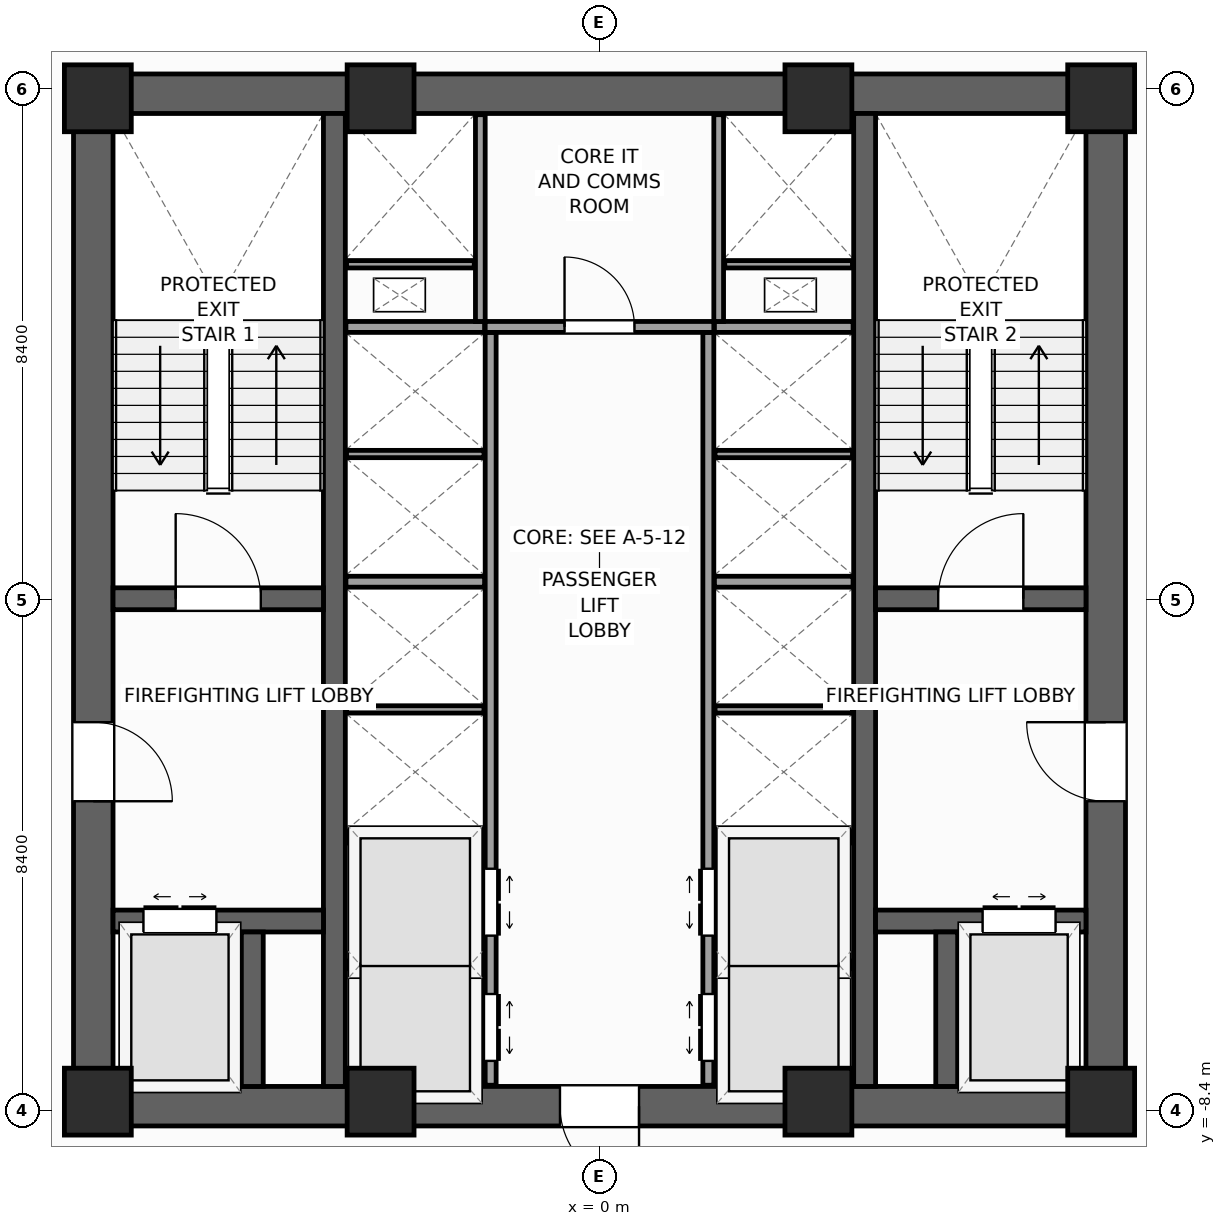
"""IFC4 building model, lengths in metres.
Left out: names, types, materials, properties, quantities, classifications, styles, units other than length and angle.
Written with IfcOpenShell. Run it as: python <this file> out.ifc"""

import sys

from ifc_helpers import new_model, si_unit, direction, frame, frame_2d, origin, origin_2d, place, context, subcontext, project, spatial, rectangle, extrude, source, transform, mapped, element, fill, save


model = new_model("IFC4")
c1 = context("Model", 3, precision=1e-05, world=origin(), true_north=direction((0.0, 1.0)))
c2 = subcontext(c1, "Body", "Model", "MODEL_VIEW")
j1 = project(units=[si_unit("LENGTHUNIT", "METRE"), si_unit("PLANEANGLEUNIT", "RADIAN")], contexts=[c1])
p1 = place(None, origin())
s1 = spatial("IfcSite", under=j1, at=p1, CompositionType="ELEMENT")
p2 = place(p1, origin())
s2 = spatial("IfcBuilding", under=s1, at=p2, CompositionType="ELEMENT")
p3 = place(p2, frame((0.0, 0.0, 99.2)))
s3 = spatial("IfcBuildingStorey", under=s2, at=p3, CompositionType="ELEMENT", Elevation=99.2)
p4 = place(p3, frame((-8.65, -8.325, 0.0), z_axis=(0.0, 0.0, 1.0), x_axis=(1.0, 0.0, 0.0)))
e1 = element("IfcWall", 1, at=p4, inside=s3, PredefinedType="SHEAR", context=c2, shape_type="SweptSolid", body=[
    extrude(rectangle(XDim=17.3, YDim=0.65, at=frame_2d((8.65, 0.0))), origin(), (0.0, 0.0, 1.0), 4.0),
])
p5 = place(p4, frame((8.0, 0.0, 0.0)))
e2 = element("IfcOpeningElement", 2, at=p5, cuts=e1, PredefinedType="OPENING", context=c2, shape_type="SweptSolid", body=[
    extrude(rectangle(XDim=1.3, YDim=2.2, at=frame_2d((0.65, 1.1))), frame((0.0, 0.335, 0.0), z_axis=(0.0, -1.0, 0.0), x_axis=(1.0, 0.0, 0.0)), (0.0, 0.0, 1.0), 0.67),
])
p6 = place(p3, frame((-8.65, 8.325, 0.0), z_axis=(0.0, 0.0, 1.0), x_axis=(1.0, 0.0, 0.0)))
e3 = element("IfcWall", 3, at=p6, inside=s3, PredefinedType="SHEAR", context=c2, shape_type="SweptSolid", body=[
    extrude(rectangle(XDim=17.3, YDim=0.65, at=frame_2d((8.65, 0.0))), origin(), (0.0, 0.0, 1.0), 4.0),
])
p7 = place(p3, frame((-8.325, -8.0, 0.0), z_axis=(0.0, 0.0, 1.0), x_axis=(0.0, 1.0, 0.0)))
e4 = element("IfcWall", 4, at=p7, inside=s3, PredefinedType="SHEAR", context=c2, shape_type="SweptSolid", body=[
    extrude(rectangle(XDim=16.0, YDim=0.65, at=frame_2d((8.0, 0.0))), origin(), (0.0, 0.0, 1.0), 4.0),
])
p8 = place(p7, frame((4.69, 0.0, 0.0)))
e5 = element("IfcOpeningElement", 5, at=p8, cuts=e4, PredefinedType="OPENING", context=c2, shape_type="SweptSolid", body=[
    extrude(rectangle(XDim=1.3, YDim=2.2, at=frame_2d((0.65, 1.1))), frame((0.0, 0.335, 0.0), z_axis=(0.0, -1.0, 0.0), x_axis=(1.0, 0.0, 0.0)), (0.0, 0.0, 1.0), 0.67),
])
p9 = place(p3, frame((8.325, -8.0, 0.0), z_axis=(0.0, 0.0, 1.0), x_axis=(0.0, 1.0, 0.0)))
e6 = element("IfcWall", 6, at=p9, inside=s3, PredefinedType="SHEAR", context=c2, shape_type="SweptSolid", body=[
    extrude(rectangle(XDim=16.0, YDim=0.65, at=frame_2d((8.0, 0.0))), origin(), (0.0, 0.0, 1.0), 4.0),
])
p10 = place(p9, frame((4.69, 0.0, 0.0)))
e7 = element("IfcOpeningElement", 7, at=p10, cuts=e6, PredefinedType="OPENING", context=c2, shape_type="SweptSolid", body=[
    extrude(rectangle(XDim=1.3, YDim=2.2, at=frame_2d((0.65, 1.1))), frame((0.0, 0.335, 0.0), z_axis=(0.0, -1.0, 0.0), x_axis=(1.0, 0.0, 0.0)), (0.0, 0.0, 1.0), 0.67),
])
for number, where, z_axis, x_axis in (
    (8, (-4.36, -8.0, 0.0), (0.0, 0.0, 1.0), (0.0, 1.0, 0.0)),
    (9, (4.36, -8.0, 0.0), (0.0, 0.0, 1.0), (0.0, 1.0, 0.0)),
):
    element("IfcWall", number, at=place(p3, frame(where, z_axis=z_axis, x_axis=x_axis)), inside=s3, PredefinedType="SHEAR", context=c2, shape_type="SweptSolid", body=[
        extrude(rectangle(XDim=16.0, YDim=0.36, at=frame_2d((8.0, 0.0))), origin(), (0.0, 0.0, 1.0), 4.0),
    ])
p11 = place(p3, frame((-8.0, 0.02, 0.0), z_axis=(0.0, 0.0, 1.0), x_axis=(1.0, 0.0, 0.0)))
e10 = element("IfcWall", 10, at=p11, inside=s3, PredefinedType="SHEAR", context=c2, shape_type="SweptSolid", body=[
    extrude(rectangle(XDim=3.46, YDim=0.36, at=frame_2d((1.73, 0.0))), origin(), (0.0, 0.0, 1.0), 4.0),
])
p12 = place(p11, frame((1.03, 0.0, 0.0)))
e11 = element("IfcOpeningElement", 11, at=p12, cuts=e10, PredefinedType="OPENING", context=c2, shape_type="SweptSolid", body=[
    extrude(rectangle(XDim=1.4, YDim=2.2, at=frame_2d((0.7, 1.1))), frame((0.0, 0.19, 0.0), z_axis=(0.0, -1.0, 0.0), x_axis=(1.0, 0.0, 0.0)), (0.0, 0.0, 1.0), 0.38),
])
p13 = place(p3, frame((4.54, 0.02, 0.0), z_axis=(0.0, 0.0, 1.0), x_axis=(1.0, 0.0, 0.0)))
e12 = element("IfcWall", 12, at=p13, inside=s3, PredefinedType="SHEAR", context=c2, shape_type="SweptSolid", body=[
    extrude(rectangle(XDim=3.46, YDim=0.36, at=frame_2d((1.73, 0.0))), origin(), (0.0, 0.0, 1.0), 4.0),
])
p14 = place(p13, frame((1.03, 0.0, 0.0)))
e13 = element("IfcOpeningElement", 13, at=p14, cuts=e12, PredefinedType="OPENING", context=c2, shape_type="SweptSolid", body=[
    extrude(rectangle(XDim=1.4, YDim=2.2, at=frame_2d((0.7, 1.1))), frame((0.0, 0.19, 0.0), z_axis=(0.0, -1.0, 0.0), x_axis=(1.0, 0.0, 0.0)), (0.0, 0.0, 1.0), 0.38),
])
p15 = place(p3, frame((-8.0, -5.28, 0.0), z_axis=(0.0, 0.0, 1.0), x_axis=(1.0, 0.0, 0.0)))
e14 = element("IfcWall", 14, at=p15, inside=s3, PredefinedType="SHEAR", context=c2, shape_type="SweptSolid", body=[
    extrude(rectangle(XDim=3.46, YDim=0.36, at=frame_2d((1.73, 0.0))), origin(), (0.0, 0.0, 1.0), 4.0),
])
p16 = place(p15, frame((0.5, 0.0, 0.0)))
e15 = element("IfcOpeningElement", 15, at=p16, cuts=e14, PredefinedType="OPENING", context=c2, shape_type="SweptSolid", body=[
    extrude(rectangle(XDim=1.2, YDim=2.25, at=frame_2d((0.6, 1.125))), frame((0.0, 0.19, 0.0), z_axis=(0.0, -1.0, 0.0), x_axis=(1.0, 0.0, 0.0)), (0.0, 0.0, 1.0), 0.38),
])
p17 = place(p3, frame((4.54, -5.28, 0.0), z_axis=(0.0, 0.0, 1.0), x_axis=(1.0, 0.0, 0.0)))
e16 = element("IfcWall", 16, at=p17, inside=s3, PredefinedType="SHEAR", context=c2, shape_type="SweptSolid", body=[
    extrude(rectangle(XDim=3.46, YDim=0.36, at=frame_2d((1.73, 0.0))), origin(), (0.0, 0.0, 1.0), 4.0),
])
p18 = place(p17, frame((1.76, 0.0, 0.0)))
e17 = element("IfcOpeningElement", 17, at=p18, cuts=e16, PredefinedType="OPENING", context=c2, shape_type="SweptSolid", body=[
    extrude(rectangle(XDim=1.2, YDim=2.25, at=frame_2d((0.6, 1.125))), frame((0.0, 0.19, 0.0), z_axis=(0.0, -1.0, 0.0), x_axis=(1.0, 0.0, 0.0)), (0.0, 0.0, 1.0), 0.38),
])
for number, where, z_axis, x_axis in (
    (18, (-5.71, -8.0, 0.0), (0.0, 0.0, 1.0), (0.0, 1.0, 0.0)),
    (19, (5.71, -8.0, 0.0), (0.0, 0.0, 1.0), (0.0, 1.0, 0.0)),
):
    element("IfcWall", number, at=place(p3, frame(where, z_axis=z_axis, x_axis=x_axis)), inside=s3, PredefinedType="SHEAR", context=c2, shape_type="SweptSolid", body=[
        extrude(rectangle(XDim=2.54, YDim=0.36, at=frame_2d((1.27, 0.0))), origin(), (0.0, 0.0, 1.0), 4.0),
    ])
m1 = source(origin(), c2, "Body", "SweptSolid", [
    extrude(rectangle(XDim=1.1, YDim=1.1, at=origin_2d()), origin(), (0.0, 0.0, 1.0), 4.0),
])
for number, where, z_axis, x_axis in (
    (20, (-8.25, -8.25, 0.0), (0.0, 0.0, 1.0), (1.0, 0.0, 0.0)),
    (21, (8.25, -8.25, 0.0), (0.0, 0.0, 1.0), (1.0, 0.0, 0.0)),
    (22, (8.25, 8.25, 0.0), (0.0, 0.0, 1.0), (1.0, 0.0, 0.0)),
    (23, (-8.25, 8.25, 0.0), (0.0, 0.0, 1.0), (1.0, 0.0, 0.0)),
    (24, (-3.6, -8.25, 0.0), (0.0, 0.0, 1.0), (1.0, 0.0, 0.0)),
    (25, (3.6, -8.25, 0.0), (0.0, 0.0, 1.0), (1.0, 0.0, 0.0)),
    (26, (-3.6, 8.25, 0.0), (0.0, 0.0, 1.0), (1.0, 0.0, 0.0)),
    (27, (3.6, 8.25, 0.0), (0.0, 0.0, 1.0), (1.0, 0.0, 0.0)),
):
    element("IfcColumn", number, at=place(p3, frame(where, z_axis=z_axis, x_axis=x_axis)), inside=s3, PredefinedType="PILASTER", context=c2, shape_type="MappedRepresentation", body=[
        mapped(m1, transform((0.0, 0.0, 0.0), scale=1.0)),
    ])
p19 = place(p3, frame((-1.79, -7.98, 0.0), z_axis=(0.0, 0.0, 1.0), x_axis=(0.0, 1.0, 0.0)))
e28 = element("IfcWall", 28, at=p19, inside=s3, PredefinedType="PARTITIONING", context=c2, shape_type="SweptSolid", body=[
    extrude(rectangle(XDim=12.38, YDim=0.18, at=frame_2d((6.19, 0.0))), origin(), (0.0, 0.0, 1.0), 3.74),
])
p20 = place(p19, frame((0.4, 0.0, 0.0)))
e29 = element("IfcOpeningElement", 29, at=p20, cuts=e28, PredefinedType="OPENING", context=c2, shape_type="SweptSolid", body=[
    extrude(rectangle(XDim=1.1, YDim=2.2, at=frame_2d((0.55, 1.1))), frame((0.0, 0.1, 0.0), z_axis=(0.0, -1.0, 0.0), x_axis=(1.0, 0.0, 0.0)), (0.0, 0.0, 1.0), 0.2),
])
p21 = place(p19, frame((2.46, 0.0, 0.0)))
e30 = element("IfcOpeningElement", 30, at=p21, cuts=e28, PredefinedType="OPENING", context=c2, shape_type="SweptSolid", body=[
    extrude(rectangle(XDim=1.1, YDim=2.2, at=frame_2d((0.55, 1.1))), frame((0.0, 0.1, 0.0), z_axis=(0.0, -1.0, 0.0), x_axis=(1.0, 0.0, 0.0)), (0.0, 0.0, 1.0), 0.2),
])
p22 = place(p3, frame((1.79, -7.98, 0.0), z_axis=(0.0, 0.0, 1.0), x_axis=(0.0, 1.0, 0.0)))
e31 = element("IfcWall", 31, at=p22, inside=s3, PredefinedType="PARTITIONING", context=c2, shape_type="SweptSolid", body=[
    extrude(rectangle(XDim=12.38, YDim=0.18, at=frame_2d((6.19, 0.0))), origin(), (0.0, 0.0, 1.0), 3.74),
])
p23 = place(p22, frame((0.4, 0.0, 0.0)))
e32 = element("IfcOpeningElement", 32, at=p23, cuts=e31, PredefinedType="OPENING", context=c2, shape_type="SweptSolid", body=[
    extrude(rectangle(XDim=1.1, YDim=2.2, at=frame_2d((0.55, 1.1))), frame((0.0, 0.1, 0.0), z_axis=(0.0, -1.0, 0.0), x_axis=(1.0, 0.0, 0.0)), (0.0, 0.0, 1.0), 0.2),
])
p24 = place(p22, frame((2.46, 0.0, 0.0)))
e33 = element("IfcOpeningElement", 33, at=p24, cuts=e31, PredefinedType="OPENING", context=c2, shape_type="SweptSolid", body=[
    extrude(rectangle(XDim=1.1, YDim=2.2, at=frame_2d((0.55, 1.1))), frame((0.0, 0.1, 0.0), z_axis=(0.0, -1.0, 0.0), x_axis=(1.0, 0.0, 0.0)), (0.0, 0.0, 1.0), 0.2),
])
p25 = place(p3, frame((-1.88, 4.49, 0.0), z_axis=(0.0, 0.0, 1.0), x_axis=(1.0, 0.0, 0.0)))
e34 = element("IfcWall", 34, at=p25, inside=s3, PredefinedType="PARTITIONING", context=c2, shape_type="SweptSolid", body=[
    extrude(rectangle(XDim=3.76, YDim=0.18, at=frame_2d((1.88, 0.0))), origin(), (0.0, 0.0, 1.0), 3.74),
])
p26 = place(p25, frame((1.305, 0.0, 0.0)))
e35 = element("IfcOpeningElement", 35, at=p26, cuts=e34, PredefinedType="OPENING", context=c2, shape_type="SweptSolid", body=[
    extrude(rectangle(XDim=1.15, YDim=2.25, at=frame_2d((0.575, 1.125))), frame((0.0, 0.1, 0.0), z_axis=(0.0, -1.0, 0.0), x_axis=(1.0, 0.0, 0.0)), (0.0, 0.0, 1.0), 0.2),
])
for number, where, z_axis, x_axis in (
    (36, (-4.17, -3.9, 0.0), (0.0, 0.0, 1.0), (1.0, 0.0, 0.0)),
    (37, (1.89, -3.9, 0.0), (0.0, 0.0, 1.0), (1.0, 0.0, 0.0)),
    (38, (-4.17, 0.3, 0.0), (0.0, 0.0, 1.0), (1.0, 0.0, 0.0)),
    (39, (1.89, 0.3, 0.0), (0.0, 0.0, 1.0), (1.0, 0.0, 0.0)),
    (40, (-4.17, 4.49, 0.0), (0.0, 0.0, 1.0), (1.0, 0.0, 0.0)),
    (41, (1.89, 4.49, 0.0), (0.0, 0.0, 1.0), (1.0, 0.0, 0.0)),
):
    element("IfcWall", number, at=place(p3, frame(where, z_axis=z_axis, x_axis=x_axis)), inside=s3, PredefinedType="PARTITIONING", context=c2, shape_type="SweptSolid", body=[
        extrude(rectangle(XDim=2.28, YDim=0.18, at=frame_2d((1.14, 0.0))), origin(), (0.0, 0.0, 1.0), 3.74),
    ])
for number, where, z_axis, x_axis in (
    (42, (-4.16, -6.0, 0.0), (0.0, 0.0, 1.0), (1.0, 0.0, 0.0)),
    (43, (1.9, -6.0, 0.0), (0.0, 0.0, 1.0), (1.0, 0.0, 0.0)),
    (44, (-4.16, -1.8, 0.0), (0.0, 0.0, 1.0), (1.0, 0.0, 0.0)),
    (45, (1.9, -1.8, 0.0), (0.0, 0.0, 1.0), (1.0, 0.0, 0.0)),
    (46, (-4.16, 2.4, 0.0), (0.0, 0.0, 1.0), (1.0, 0.0, 0.0)),
    (47, (1.9, 2.4, 0.0), (0.0, 0.0, 1.0), (1.0, 0.0, 0.0)),
):
    element("IfcWall", number, at=place(p3, frame(where, z_axis=z_axis, x_axis=x_axis)), inside=s3, PredefinedType="PARTITIONING", context=c2, shape_type="SweptSolid", body=[
        extrude(rectangle(XDim=2.26, YDim=0.12, at=frame_2d((1.13, 0.0))), origin(), (0.0, 0.0, 1.0), 3.74),
    ])
for number, where, z_axis, x_axis in (
    (48, (-1.96, 4.58, 0.0), (0.0, 0.0, 1.0), (0.0, 1.0, 0.0)),
    (49, (1.96, 4.58, 0.0), (0.0, 0.0, 1.0), (0.0, 1.0, 0.0)),
):
    element("IfcWall", number, at=place(p3, frame(where, z_axis=z_axis, x_axis=x_axis)), inside=s3, PredefinedType="PARTITIONING", context=c2, shape_type="SweptSolid", body=[
        extrude(rectangle(XDim=3.4, YDim=0.16, at=frame_2d((1.7, 0.0))), origin(), (0.0, 0.0, 1.0), 3.74),
    ])
for number, where, z_axis, x_axis in (
    (50, (-4.16, 5.52, 0.0), (0.0, 0.0, 1.0), (1.0, 0.0, 0.0)),
    (51, (2.06, 5.52, 0.0), (0.0, 0.0, 1.0), (1.0, 0.0, 0.0)),
):
    element("IfcWall", number, at=place(p3, frame(where, z_axis=z_axis, x_axis=x_axis)), inside=s3, PredefinedType="PARTITIONING", context=c2, shape_type="SweptSolid", body=[
        extrude(rectangle(XDim=2.1, YDim=0.12, at=frame_2d((1.05, 0.0))), origin(), (0.0, 0.0, 1.0), 3.74),
    ])
m2 = source(origin(), c2, "Body", "SweptSolid", [
    extrude(rectangle(XDim=1.4, YDim=2.2, at=frame_2d((0.7, 1.1))), frame((0.0, 0.025, 0.0), z_axis=(0.0, -1.0, 0.0), x_axis=(1.0, 0.0, 0.0)), (0.0, 0.0, 1.0), 0.05),
])
p27 = place(p12, origin())
e52 = element("IfcDoor", 52, at=p27, inside=s3, OperationType="SINGLE_SWING_LEFT", PredefinedType="DOOR", context=c2, shape_type="MappedRepresentation", body=[
    mapped(m2, transform((0.0, 0.0, 0.0), scale=1.0)),
])
fill(e11, e52)
p28 = place(p14, origin())
e53 = element("IfcDoor", 53, at=p28, inside=s3, OperationType="SINGLE_SWING_RIGHT", PredefinedType="DOOR", context=c2, shape_type="MappedRepresentation", body=[
    mapped(m2, transform((0.0, 0.0, 0.0), scale=1.0)),
])
fill(e13, e53)
m3 = source(origin(), c2, "Body", "SweptSolid", [
    extrude(rectangle(XDim=1.3, YDim=2.2, at=frame_2d((0.65, 1.1))), frame((0.0, 0.025, 0.0), z_axis=(0.0, -1.0, 0.0), x_axis=(1.0, 0.0, 0.0)), (0.0, 0.0, 1.0), 0.05),
])
p29 = place(p8, frame((1.3, 0.0, 0.0), z_axis=(0.0, 0.0, 1.0), x_axis=(-1.0, 0.0, 0.0)))
e54 = element("IfcDoor", 54, at=p29, inside=s3, OperationType="SINGLE_SWING_LEFT", PredefinedType="DOOR", context=c2, shape_type="MappedRepresentation", body=[
    mapped(m3, transform((0.0, 0.0, 0.0), scale=1.0)),
])
fill(e5, e54)
p30 = place(p10, origin())
e55 = element("IfcDoor", 55, at=p30, inside=s3, OperationType="SINGLE_SWING_RIGHT", PredefinedType="DOOR", context=c2, shape_type="MappedRepresentation", body=[
    mapped(m3, transform((0.0, 0.0, 0.0), scale=1.0)),
])
fill(e7, e55)
p31 = place(p5, frame((1.3, 0.0, 0.0), z_axis=(0.0, 0.0, 1.0), x_axis=(-1.0, 0.0, 0.0)))
e56 = element("IfcDoor", 56, at=p31, inside=s3, OperationType="SINGLE_SWING_RIGHT", PredefinedType="DOOR", context=c2, shape_type="MappedRepresentation", body=[
    mapped(m3, transform((0.0, 0.0, 0.0), scale=1.0)),
])
fill(e2, e56)
m4 = source(origin(), c2, "Body", "SweptSolid", [
    extrude(rectangle(XDim=1.2, YDim=2.25, at=frame_2d((0.6, 1.125))), frame((0.0, 0.025, 0.0), z_axis=(0.0, -1.0, 0.0), x_axis=(1.0, 0.0, 0.0)), (0.0, 0.0, 1.0), 0.05),
])
p32 = place(p16, origin())
e57 = element("IfcDoor", 57, at=p32, inside=s3, OperationType="DOUBLE_DOOR_SLIDING", PredefinedType="DOOR", context=c2, shape_type="MappedRepresentation", body=[
    mapped(m4, transform((0.0, 0.0, 0.0), scale=1.0)),
])
fill(e15, e57)
p33 = place(p18, origin())
e58 = element("IfcDoor", 58, at=p33, inside=s3, OperationType="DOUBLE_DOOR_SLIDING", PredefinedType="DOOR", context=c2, shape_type="MappedRepresentation", body=[
    mapped(m4, transform((0.0, 0.0, 0.0), scale=1.0)),
])
fill(e17, e58)
m5 = source(origin(), c2, "Body", "SweptSolid", [
    extrude(rectangle(XDim=1.1, YDim=2.2, at=frame_2d((0.55, 1.1))), frame((0.0, 0.025, 0.0), z_axis=(0.0, -1.0, 0.0), x_axis=(1.0, 0.0, 0.0)), (0.0, 0.0, 1.0), 0.05),
])
p34 = place(p20, frame((1.1, 0.0, 0.0), z_axis=(0.0, 0.0, 1.0), x_axis=(-1.0, 0.0, 0.0)))
e59 = element("IfcDoor", 59, at=p34, inside=s3, OperationType="DOUBLE_DOOR_SLIDING", PredefinedType="DOOR", context=c2, shape_type="MappedRepresentation", body=[
    mapped(m5, transform((0.0, 0.0, 0.0), scale=1.0)),
])
fill(e29, e59)
p35 = place(p21, frame((1.1, 0.0, 0.0), z_axis=(0.0, 0.0, 1.0), x_axis=(-1.0, 0.0, 0.0)))
e60 = element("IfcDoor", 60, at=p35, inside=s3, OperationType="DOUBLE_DOOR_SLIDING", PredefinedType="DOOR", context=c2, shape_type="MappedRepresentation", body=[
    mapped(m5, transform((0.0, 0.0, 0.0), scale=1.0)),
])
fill(e30, e60)
p36 = place(p23, origin())
e61 = element("IfcDoor", 61, at=p36, inside=s3, OperationType="DOUBLE_DOOR_SLIDING", PredefinedType="DOOR", context=c2, shape_type="MappedRepresentation", body=[
    mapped(m5, transform((0.0, 0.0, 0.0), scale=1.0)),
])
fill(e32, e61)
p37 = place(p24, origin())
e62 = element("IfcDoor", 62, at=p37, inside=s3, OperationType="DOUBLE_DOOR_SLIDING", PredefinedType="DOOR", context=c2, shape_type="MappedRepresentation", body=[
    mapped(m5, transform((0.0, 0.0, 0.0), scale=1.0)),
])
fill(e33, e62)
m6 = source(origin(), c2, "Body", "SweptSolid", [
    extrude(rectangle(XDim=1.15, YDim=2.25, at=frame_2d((0.575, 1.125))), frame((0.0, 0.025, 0.0), z_axis=(0.0, -1.0, 0.0), x_axis=(1.0, 0.0, 0.0)), (0.0, 0.0, 1.0), 0.05),
])
p38 = place(p26, origin())
e63 = element("IfcDoor", 63, at=p38, inside=s3, OperationType="SINGLE_SWING_LEFT", PredefinedType="DOOR", context=c2, shape_type="MappedRepresentation", body=[
    mapped(m6, transform((0.0, 0.0, 0.0), scale=1.0)),
])
fill(e35, e63)
save(model, sys.argv[1])
